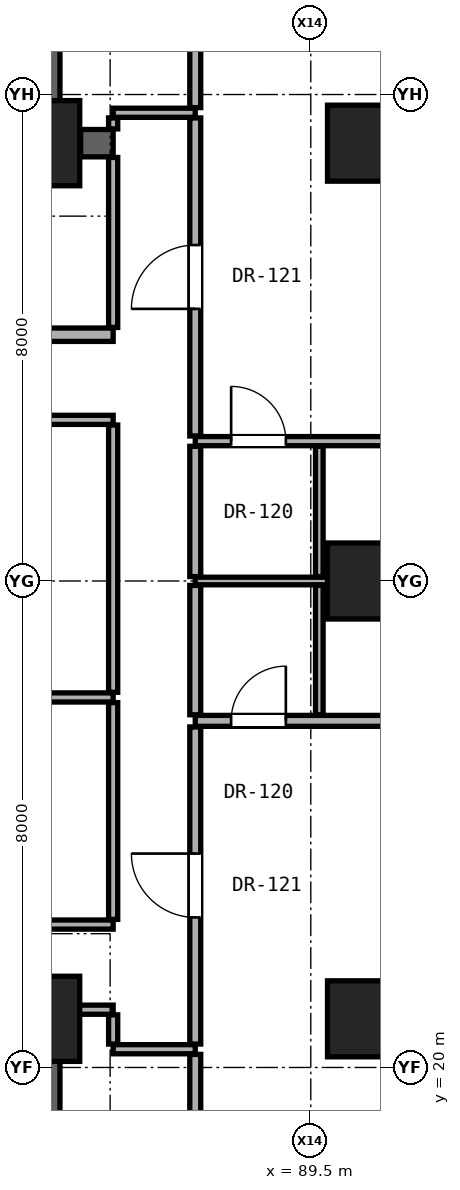
"""IFC4 building model, lengths in metres.
Left out: names, types, materials, properties, quantities, classifications, styles, units other than length and angle.
Written with IfcOpenShell. Run it as: python <this file> out.ifc"""

import sys

from ifc_helpers import new_model, si_unit, direction, frame, frame_2d, origin, origin_2d, place, context, subcontext, project, spatial, rectangle, hollow_rectangle, extrude, element, fill, save


model = new_model("IFC4")
c1 = context("Model", 3, precision=1e-05, world=origin(), true_north=direction((0.0, 1.0)))
c2 = subcontext(c1, "Body", "Model", "MODEL_VIEW")
j1 = project(units=[si_unit("LENGTHUNIT", "METRE"), si_unit("PLANEANGLEUNIT", "RADIAN")], contexts=[c1])
p1 = place(None, origin())
s1 = spatial("IfcSite", under=j1, at=p1, CompositionType="ELEMENT")
p2 = place(p1, origin())
s2 = spatial("IfcBuilding", under=s1, at=p2, CompositionType="ELEMENT")
p3 = place(p2, frame((0.0, 0.0, 42.2)))
s3 = spatial("IfcBuildingStorey", under=s2, at=p3, CompositionType="ELEMENT", Elevation=42.2)
for number, where, z_axis, x_axis in (
    (1, (85.0, 20.8, 0.0), (0.0, 0.0, 1.0), (1.0, 0.0, 0.0)),
    (2, (85.0, 35.2, 0.0), (0.0, 0.0, 1.0), (1.0, 0.0, 0.0)),
):
    element("IfcColumn", number, at=place(p3, frame(where, z_axis=z_axis, x_axis=x_axis)), inside=s3, PredefinedType="COLUMN", context=c2, shape_type="SweptSolid", body=[
        extrude(rectangle(XDim=1.4, YDim=1.4, at=origin_2d()), origin(), (0.0, 0.0, 1.0), 3.3),
    ])
for number, where, z_axis, x_axis in (
    (3, (90.4, 20.8, 0.0), (0.0, 0.0, 1.0), (1.0, 0.0, 0.0)),
    (4, (90.4, 28.0, 0.0), (0.0, 0.0, 1.0), (1.0, 0.0, 0.0)),
    (5, (90.4, 35.2, 0.0), (0.0, 0.0, 1.0), (1.0, 0.0, 0.0)),
):
    element("IfcColumn", number, at=place(p3, frame(where, z_axis=z_axis, x_axis=x_axis)), inside=s3, PredefinedType="COLUMN", context=c2, shape_type="SweptSolid", body=[
        extrude(hollow_rectangle(XDim=1.25, YDim=1.25, WallThickness=0.07, at=origin_2d()), origin(), (0.0, 0.0, 1.0), 3.3),
    ])
for number, where, z_axis, x_axis in (
    (6, (85.0, 35.2, 0.0), (0.0, 0.0, 1.0), (0.0, 1.0, 0.0)),
    (7, (85.0, 15.2, 0.0), (0.0, 0.0, 1.0), (0.0, 1.0, 0.0)),
):
    element("IfcWall", number, at=place(p3, frame(where, z_axis=z_axis, x_axis=x_axis)), inside=s3, PredefinedType="SHEAR", context=c2, shape_type="SweptSolid", body=[
        extrude(rectangle(XDim=5.6, YDim=0.75, at=frame_2d((2.8, 0.0))), origin(), (0.0, 0.0, 1.0), 3.06),
    ])
p4 = place(p3, frame((86.25, 20.3, 0.0), z_axis=(0.0, 0.0, 1.0), x_axis=(1.0, 0.0, 0.0)))
e8 = element("IfcWall", 8, at=p4, inside=s3, PredefinedType="PARTITIONING", context=c2, shape_type="SweptSolid", body=[
    extrude(rectangle(XDim=1.35, YDim=0.15, at=frame_2d((0.675, 0.0))), origin(), (0.0, 0.0, 1.0), 3.06),
])
p5 = place(p3, frame((85.37, 20.95, 0.0), z_axis=(0.0, 0.0, 1.0), x_axis=(1.0, 0.0, 0.0)))
e9 = element("IfcWall", 9, at=p5, inside=s3, PredefinedType="PARTITIONING", context=c2, shape_type="SweptSolid", body=[
    extrude(rectangle(XDim=0.88, YDim=0.15, at=frame_2d((0.44, 0.0))), origin(), (0.0, 0.0, 1.0), 2.452),
])
p6 = place(p3, frame((66.62, 22.35, 0.0), z_axis=(0.0, 0.0, 1.0), x_axis=(1.0, 0.0, 0.0)))
e10 = element("IfcWall", 10, at=p6, inside=s3, PredefinedType="PARTITIONING", context=c2, shape_type="SweptSolid", body=[
    extrude(rectangle(XDim=19.63, YDim=0.15, at=frame_2d((9.815, 0.0))), origin(), (0.0, 0.0, 1.0), 2.125),
])
p7 = place(p6, frame((8.981, 0.0, 0.0)))
e11 = element("IfcOpeningElement", 11, at=p7, cuts=e10, PredefinedType="OPENING", context=c2, shape_type="SweptSolid", body=[
    extrude(rectangle(XDim=0.85, YDim=2.01, at=frame_2d((0.425, 1.005))), frame((0.0, 0.085, 0.0), z_axis=(0.0, -1.0, 0.0), x_axis=(1.0, 0.0, 0.0)), (0.0, 0.0, 1.0), 0.17),
])
p8 = place(p6, frame((16.061, 0.0, 0.0)))
e12 = element("IfcOpeningElement", 12, at=p8, cuts=e10, PredefinedType="OPENING", context=c2, shape_type="SweptSolid", body=[
    extrude(rectangle(XDim=0.85, YDim=2.01, at=frame_2d((0.425, 1.005))), frame((0.0, 0.085, 0.0), z_axis=(0.0, -1.0, 0.0), x_axis=(1.0, 0.0, 0.0)), (0.0, 0.0, 1.0), 0.17),
])
p9 = place(p3, frame((87.6, 25.7, 0.0), z_axis=(0.0, 0.0, 1.0), x_axis=(1.0, 0.0, 0.0)))
e13 = element("IfcWall", 13, at=p9, inside=s3, PredefinedType="PARTITIONING", context=c2, shape_type="SweptSolid", body=[
    extrude(rectangle(XDim=8.108, YDim=0.18, at=frame_2d((4.054, 0.0))), origin(), (0.0, 0.0, 1.0), 2.196),
])
p10 = place(p9, frame((4.579, 0.0, 0.0)))
e14 = element("IfcOpeningElement", 14, at=p10, cuts=e13, PredefinedType="OPENING", context=c2, shape_type="SweptSolid", body=[
    extrude(rectangle(XDim=0.95, YDim=2.15, at=frame_2d((0.475, 1.075))), frame((0.0, 0.1, 0.0), z_axis=(0.0, -1.0, 0.0), x_axis=(1.0, 0.0, 0.0)), (0.0, 0.0, 1.0), 0.2),
])
p11 = place(p9, frame((0.59, 0.0, 0.0)))
e15 = element("IfcOpeningElement", 15, at=p11, cuts=e13, PredefinedType="OPENING", context=c2, shape_type="SweptSolid", body=[
    extrude(rectangle(XDim=0.9, YDim=2.1, at=frame_2d((0.45, 1.05))), frame((0.0, 0.1, 0.0), z_axis=(0.0, -1.0, 0.0), x_axis=(1.0, 0.0, 0.0)), (0.0, 0.0, 1.0), 0.2),
])
p12 = place(p3, frame((72.05, 26.085, 0.0), z_axis=(0.0, 0.0, 1.0), x_axis=(1.0, 0.0, 0.0)))
e16 = element("IfcWall", 16, at=p12, inside=s3, PredefinedType="PARTITIONING", context=c2, shape_type="SweptSolid", body=[
    extrude(rectangle(XDim=14.2, YDim=0.15, at=frame_2d((7.1, 0.0))), origin(), (0.0, 0.0, 1.0), 2.125),
])
p13 = place(p3, frame((87.6, 28.0, 0.0), z_axis=(0.0, 0.0, 1.0), x_axis=(1.0, 0.0, 0.0)))
e17 = element("IfcWall", 17, at=p13, inside=s3, PredefinedType="PARTITIONING", context=c2, shape_type="SweptSolid", body=[
    extrude(rectangle(XDim=8.108, YDim=0.125, at=frame_2d((4.054, 0.0))), origin(), (0.0, 0.0, 1.0), 2.196),
])
p14 = place(p3, frame((87.6, 30.3, 0.0), z_axis=(0.0, 0.0, 1.0), x_axis=(1.0, 0.0, 0.0)))
e18 = element("IfcWall", 18, at=p14, inside=s3, PredefinedType="PARTITIONING", context=c2, shape_type="SweptSolid", body=[
    extrude(rectangle(XDim=8.108, YDim=0.15, at=frame_2d((4.054, 0.0))), origin(), (0.0, 0.0, 1.0), 2.196),
])
p15 = place(p14, frame((4.579, 0.0, 0.0)))
e19 = element("IfcOpeningElement", 19, at=p15, cuts=e18, PredefinedType="OPENING", context=c2, shape_type="SweptSolid", body=[
    extrude(rectangle(XDim=0.95, YDim=2.15, at=frame_2d((0.475, 1.075))), frame((0.0, 0.085, 0.0), z_axis=(0.0, -1.0, 0.0), x_axis=(1.0, 0.0, 0.0)), (0.0, 0.0, 1.0), 0.17),
])
p16 = place(p14, frame((0.59, 0.0, 0.0)))
e20 = element("IfcOpeningElement", 20, at=p16, cuts=e18, PredefinedType="OPENING", context=c2, shape_type="SweptSolid", body=[
    extrude(rectangle(XDim=0.9, YDim=2.1, at=frame_2d((0.45, 1.05))), frame((0.0, 0.085, 0.0), z_axis=(0.0, -1.0, 0.0), x_axis=(1.0, 0.0, 0.0)), (0.0, 0.0, 1.0), 0.17),
])
p17 = place(p3, frame((66.62, 30.65, 0.0), z_axis=(0.0, 0.0, 1.0), x_axis=(1.0, 0.0, 0.0)))
e21 = element("IfcWall", 21, at=p17, inside=s3, PredefinedType="PARTITIONING", context=c2, shape_type="SweptSolid", body=[
    extrude(rectangle(XDim=19.63, YDim=0.15, at=frame_2d((9.815, 0.0))), origin(), (0.0, 0.0, 1.0), 2.125),
])
p18 = place(p17, frame((3.855, 0.0, 0.0)))
e22 = element("IfcOpeningElement", 22, at=p18, cuts=e21, PredefinedType="OPENING", context=c2, shape_type="SweptSolid", body=[
    extrude(rectangle(XDim=0.85, YDim=2.01, at=frame_2d((0.425, 1.005))), frame((0.0, 0.085, 0.0), z_axis=(0.0, -1.0, 0.0), x_axis=(1.0, 0.0, 0.0)), (0.0, 0.0, 1.0), 0.17),
])
p19 = place(p17, frame((8.981, 0.0, 0.0)))
e23 = element("IfcOpeningElement", 23, at=p19, cuts=e21, PredefinedType="OPENING", context=c2, shape_type="SweptSolid", body=[
    extrude(rectangle(XDim=0.85, YDim=2.01, at=frame_2d((0.425, 1.005))), frame((0.0, 0.085, 0.0), z_axis=(0.0, -1.0, 0.0), x_axis=(1.0, 0.0, 0.0)), (0.0, 0.0, 1.0), 0.17),
])
p20 = place(p17, frame((16.061, 0.0, 0.0)))
e24 = element("IfcOpeningElement", 24, at=p20, cuts=e21, PredefinedType="OPENING", context=c2, shape_type="SweptSolid", body=[
    extrude(rectangle(XDim=0.85, YDim=2.01, at=frame_2d((0.425, 1.005))), frame((0.0, 0.085, 0.0), z_axis=(0.0, -1.0, 0.0), x_axis=(1.0, 0.0, 0.0)), (0.0, 0.0, 1.0), 0.17),
])
p21 = place(p3, frame((71.55, 32.05, 0.0), z_axis=(0.0, 0.0, 1.0), x_axis=(1.0, 0.0, 0.0)))
e25 = element("IfcWall", 25, at=p21, inside=s3, PredefinedType="SOLIDWALL", context=c2, shape_type="SweptSolid", body=[
    extrude(rectangle(XDim=14.7, YDim=0.22, at=frame_2d((7.35, 0.0))), origin(), (0.0, 0.0, 1.0), 2.125),
])
p22 = place(p21, frame((11.39, 0.0, 0.0)))
e26 = element("IfcOpeningElement", 26, at=p22, cuts=e25, PredefinedType="OPENING", context=c2, shape_type="SweptSolid", body=[
    extrude(rectangle(XDim=0.85, YDim=2.01, at=frame_2d((0.425, 1.005))), frame((0.0, 0.12, 0.0), z_axis=(0.0, -1.0, 0.0), x_axis=(1.0, 0.0, 0.0)), (0.0, 0.0, 1.0), 0.24),
])
p23 = place(p21, frame((6.065, 0.0, 0.0)))
e27 = element("IfcOpeningElement", 27, at=p23, cuts=e25, PredefinedType="OPENING", context=c2, shape_type="SweptSolid", body=[
    extrude(rectangle(XDim=0.85, YDim=2.01, at=frame_2d((0.425, 1.005))), frame((0.0, 0.12, 0.0), z_axis=(0.0, -1.0, 0.0), x_axis=(1.0, 0.0, 0.0)), (0.0, 0.0, 1.0), 0.24),
])
p24 = place(p21, frame((1.65, 0.0, 0.0)))
e28 = element("IfcOpeningElement", 28, at=p24, cuts=e25, PredefinedType="OPENING", context=c2, shape_type="SweptSolid", body=[
    extrude(rectangle(XDim=0.85, YDim=2.01, at=frame_2d((0.425, 1.005))), frame((0.0, 0.12, 0.0), z_axis=(0.0, -1.0, 0.0), x_axis=(1.0, 0.0, 0.0)), (0.0, 0.0, 1.0), 0.24),
])
p25 = place(p3, frame((85.715, 35.2, 0.0), z_axis=(0.0, 0.0, 1.0), x_axis=(1.0, 0.0, 0.0)))
e29 = element("IfcWall", 29, at=p25, inside=s3, PredefinedType="SHEAR", context=c2, shape_type="SweptSolid", body=[
    extrude(rectangle(XDim=0.535, YDim=0.45, at=frame_2d((0.268, 0.0))), origin(), (0.0, 0.0, 1.0), 3.06),
])
p26 = place(p3, frame((86.25, 35.7, 0.0), z_axis=(0.0, 0.0, 1.0), x_axis=(1.0, 0.0, 0.0)))
e30 = element("IfcWall", 30, at=p26, inside=s3, PredefinedType="PARTITIONING", context=c2, shape_type="SweptSolid", body=[
    extrude(rectangle(XDim=1.35, YDim=0.15, at=frame_2d((0.675, 0.0))), origin(), (0.0, 0.0, 1.0), 3.06),
])
p27 = place(p3, frame((86.25, 20.385, 0.0), z_axis=(0.0, 0.0, 1.0), x_axis=(0.0, 1.0, 0.0)))
e31 = element("IfcWall", 31, at=p27, inside=s3, PredefinedType="PARTITIONING", context=c2, shape_type="SweptSolid", body=[
    extrude(rectangle(XDim=0.48, YDim=0.15, at=frame_2d((0.24, 0.0))), origin(), (0.0, 0.0, 1.0), 2.452),
])
p28 = place(p3, frame((86.25, 22.435, 0.0), z_axis=(0.0, 0.0, 1.0), x_axis=(0.0, 1.0, 0.0)))
e32 = element("IfcWall", 32, at=p28, inside=s3, PredefinedType="PARTITIONING", context=c2, shape_type="SweptSolid", body=[
    extrude(rectangle(XDim=3.565, YDim=0.15, at=frame_2d((1.782, 0.0))), origin(), (0.0, 0.0, 1.0), 3.06),
])
p29 = place(p3, frame((86.25, 26.17, 0.0), z_axis=(0.0, 0.0, 1.0), x_axis=(0.0, 1.0, 0.0)))
e33 = element("IfcWall", 33, at=p29, inside=s3, PredefinedType="PARTITIONING", context=c2, shape_type="SweptSolid", body=[
    extrude(rectangle(XDim=4.395, YDim=0.15, at=frame_2d((2.198, 0.0))), origin(), (0.0, 0.0, 1.0), 2.279),
])
p30 = place(p3, frame((86.25, 32.17, 0.0), z_axis=(0.0, 0.0, 1.0), x_axis=(0.0, 1.0, 0.0)))
e34 = element("IfcWall", 34, at=p30, inside=s3, PredefinedType="PARTITIONING", context=c2, shape_type="SweptSolid", body=[
    extrude(rectangle(XDim=2.795, YDim=0.15, at=frame_2d((1.397, 0.0))), origin(), (0.0, 0.0, 1.0), 2.452),
])
p31 = place(p3, frame((86.25, 35.435, 0.0), z_axis=(0.0, 0.0, 1.0), x_axis=(0.0, 1.0, 0.0)))
e35 = element("IfcWall", 35, at=p31, inside=s3, PredefinedType="PARTITIONING", context=c2, shape_type="SweptSolid", body=[
    extrude(rectangle(XDim=0.18, YDim=0.15, at=frame_2d((0.09, 0.0))), origin(), (0.0, 0.0, 1.0), 2.452),
])
p32 = place(p3, frame((87.6, 16.2, 0.0), z_axis=(0.0, 0.0, 1.0), x_axis=(0.0, 1.0, 0.0)))
e36 = element("IfcWall", 36, at=p32, inside=s3, PredefinedType="PARTITIONING", context=c2, shape_type="SweptSolid", body=[
    extrude(rectangle(XDim=4.015, YDim=0.18, at=frame_2d((2.008, 0.0))), origin(), (0.0, 0.0, 1.0), 2.436),
])
p33 = place(p3, frame((87.6, 20.385, 0.0), z_axis=(0.0, 0.0, 1.0), x_axis=(0.0, 1.0, 0.0)))
e37 = element("IfcWall", 37, at=p33, inside=s3, PredefinedType="PARTITIONING", context=c2, shape_type="SweptSolid", body=[
    extrude(rectangle(XDim=5.215, YDim=0.18, at=frame_2d((2.607, 0.0))), origin(), (0.0, 0.0, 1.0), 2.452),
])
p34 = place(p33, frame((2.083, 0.0, 0.0)))
e38 = element("IfcOpeningElement", 38, at=p34, cuts=e37, PredefinedType="OPENING", context=c2, shape_type="SweptSolid", body=[
    extrude(rectangle(XDim=1.05, YDim=2.2, at=frame_2d((0.525, 1.1))), frame((0.0, 0.1, 0.0), z_axis=(0.0, -1.0, 0.0), x_axis=(1.0, 0.0, 0.0)), (0.0, 0.0, 1.0), 0.2),
])
p35 = place(p3, frame((87.6, 25.8, 0.0), z_axis=(0.0, 0.0, 1.0), x_axis=(0.0, 1.0, 0.0)))
e39 = element("IfcWall", 39, at=p35, inside=s3, PredefinedType="PARTITIONING", context=c2, shape_type="SweptSolid", body=[
    extrude(rectangle(XDim=2.127, YDim=0.18, at=frame_2d((1.064, 0.0))), origin(), (0.0, 0.0, 1.0), 2.279),
])
p36 = place(p3, frame((87.6, 28.073, 0.0), z_axis=(0.0, 0.0, 1.0), x_axis=(0.0, 1.0, 0.0)))
e40 = element("IfcWall", 40, at=p36, inside=s3, PredefinedType="PARTITIONING", context=c2, shape_type="SweptSolid", body=[
    extrude(rectangle(XDim=2.143, YDim=0.18, at=frame_2d((1.071, 0.0))), origin(), (0.0, 0.0, 1.0), 2.279),
])
p37 = place(p3, frame((87.6, 30.385, 0.0), z_axis=(0.0, 0.0, 1.0), x_axis=(0.0, 1.0, 0.0)))
e41 = element("IfcWall", 41, at=p37, inside=s3, PredefinedType="PARTITIONING", context=c2, shape_type="SweptSolid", body=[
    extrude(rectangle(XDim=5.23, YDim=0.18, at=frame_2d((2.615, 0.0))), origin(), (0.0, 0.0, 1.0), 2.452),
])
p38 = place(p37, frame((2.09, 0.0, 0.0)))
e42 = element("IfcOpeningElement", 42, at=p38, cuts=e41, PredefinedType="OPENING", context=c2, shape_type="SweptSolid", body=[
    extrude(rectangle(XDim=1.05, YDim=2.2, at=frame_2d((0.525, 1.1))), frame((0.0, 0.1, 0.0), z_axis=(0.0, -1.0, 0.0), x_axis=(1.0, 0.0, 0.0)), (0.0, 0.0, 1.0), 0.2),
])
p39 = place(p3, frame((87.6, 35.785, 0.0), z_axis=(0.0, 0.0, 1.0), x_axis=(0.0, 1.0, 0.0)))
e43 = element("IfcWall", 43, at=p39, inside=s3, PredefinedType="PARTITIONING", context=c2, shape_type="SweptSolid", body=[
    extrude(rectangle(XDim=4.03, YDim=0.18, at=frame_2d((2.015, 0.0))), origin(), (0.0, 0.0, 1.0), 2.436),
])
p40 = place(p3, frame((89.64, 25.8, 0.0), z_axis=(0.0, 0.0, 1.0), x_axis=(0.0, 1.0, 0.0)))
e44 = element("IfcWall", 44, at=p40, inside=s3, PredefinedType="PARTITIONING", context=c2, shape_type="SweptSolid", body=[
    extrude(rectangle(XDim=2.127, YDim=0.125, at=frame_2d((1.064, 0.0))), origin(), (0.0, 0.0, 1.0), 2.279),
])
p41 = place(p3, frame((89.64, 28.073, 0.0), z_axis=(0.0, 0.0, 1.0), x_axis=(0.0, 1.0, 0.0)))
e45 = element("IfcWall", 45, at=p41, inside=s3, PredefinedType="PARTITIONING", context=c2, shape_type="SweptSolid", body=[
    extrude(rectangle(XDim=2.143, YDim=0.125, at=frame_2d((1.071, 0.0))), origin(), (0.0, 0.0, 1.0), 2.279),
])
p42 = place(p34, origin())
e46 = element("IfcDoor", 46, at=p42, inside=s3, OperationType="SINGLE_SWING_RIGHT", PredefinedType="DOOR", context=c2, shape_type="SweptSolid", body=[
    extrude(rectangle(XDim=1.05, YDim=2.2, at=frame_2d((0.525, 1.1))), frame((0.0, 0.025, 0.0), z_axis=(0.0, -1.0, 0.0), x_axis=(1.0, 0.0, 0.0)), (0.0, 0.0, 1.0), 0.05),
])
fill(e38, e46)
p43 = place(p11, origin())
e47 = element("IfcDoor", 47, at=p43, inside=s3, OperationType="SINGLE_SWING_RIGHT", PredefinedType="DOOR", context=c2, shape_type="SweptSolid", body=[
    extrude(rectangle(XDim=0.9, YDim=2.1, at=frame_2d((0.45, 1.05))), frame((0.0, 0.025, 0.0), z_axis=(0.0, -1.0, 0.0), x_axis=(1.0, 0.0, 0.0)), (0.0, 0.0, 1.0), 0.05),
])
fill(e15, e47)
p44 = place(p38, origin())
e48 = element("IfcDoor", 48, at=p44, inside=s3, OperationType="SINGLE_SWING_LEFT", PredefinedType="DOOR", context=c2, shape_type="SweptSolid", body=[
    extrude(rectangle(XDim=1.05, YDim=2.2, at=frame_2d((0.525, 1.1))), frame((0.0, 0.025, 0.0), z_axis=(0.0, -1.0, 0.0), x_axis=(1.0, 0.0, 0.0)), (0.0, 0.0, 1.0), 0.05),
])
fill(e42, e48)
p45 = place(p16, origin())
e49 = element("IfcDoor", 49, at=p45, inside=s3, OperationType="SINGLE_SWING_LEFT", PredefinedType="DOOR", context=c2, shape_type="SweptSolid", body=[
    extrude(rectangle(XDim=0.9, YDim=2.1, at=frame_2d((0.45, 1.05))), frame((0.0, 0.025, 0.0), z_axis=(0.0, -1.0, 0.0), x_axis=(1.0, 0.0, 0.0)), (0.0, 0.0, 1.0), 0.05),
])
fill(e20, e49)
save(model, sys.argv[1])
